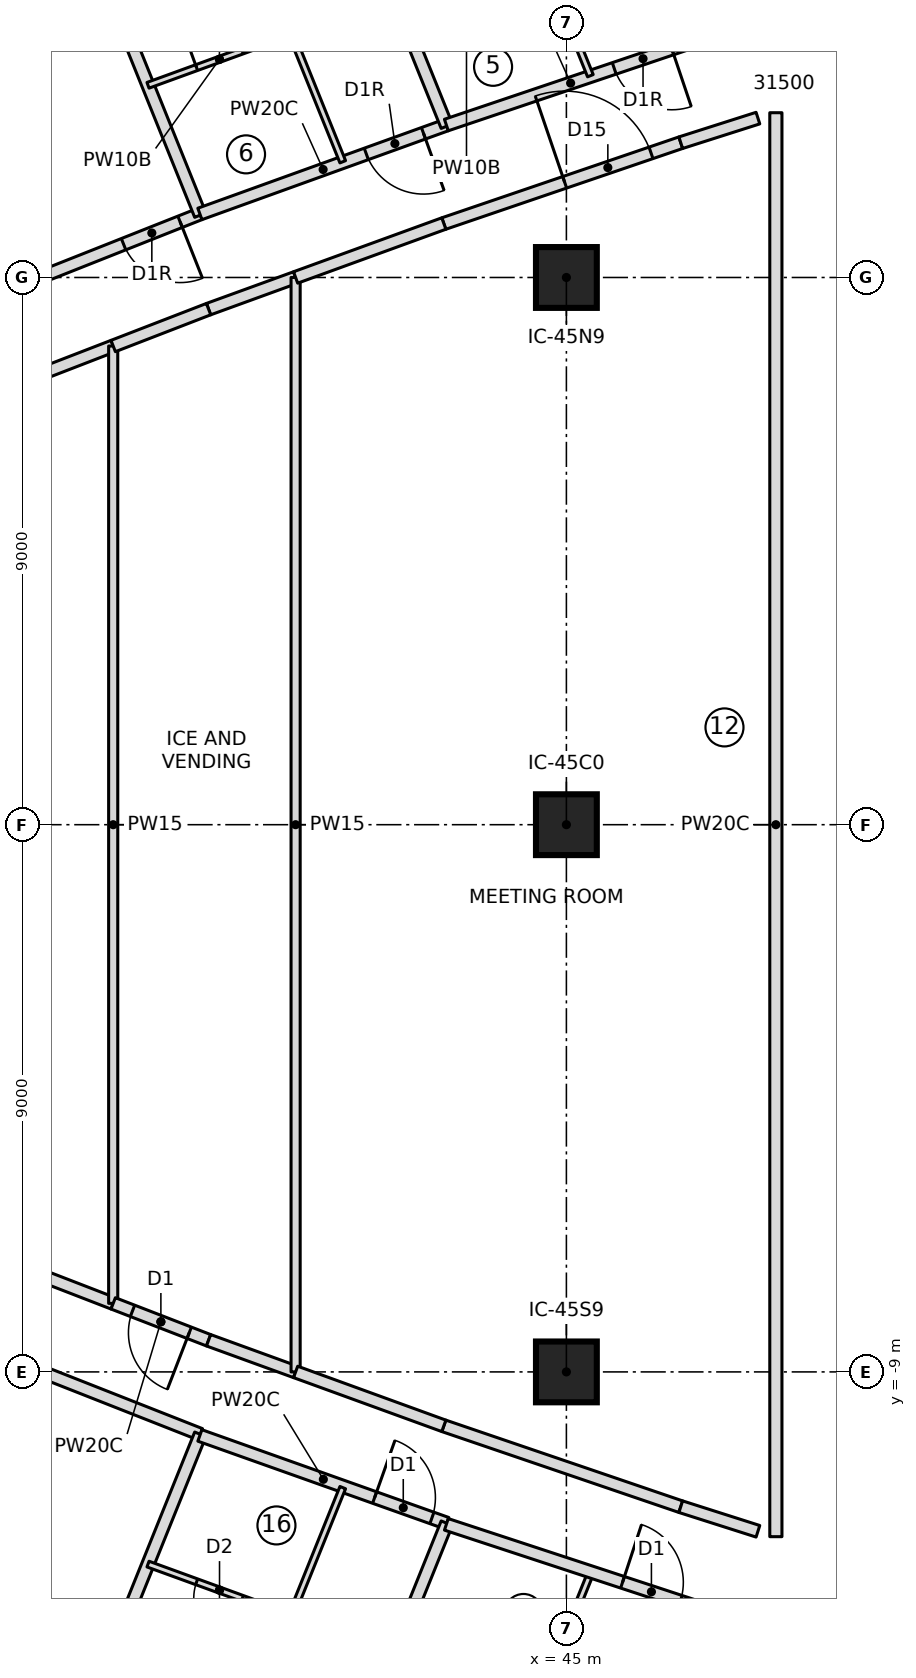
"""IFC4 building model, lengths in metres.
Left out: names, types, materials, properties, quantities, classifications, styles, units other than length and angle.
Written with IfcOpenShell. Run it as: python <this file> out.ifc"""

import sys

from ifc_helpers import new_model, si_unit, direction, frame, frame_2d, origin, origin_2d, place, context, subcontext, project, spatial, rectangle, extrude, element, fill, save


model = new_model("IFC4")
c1 = context("Model", 3, precision=1e-05, world=origin(), true_north=direction((0.0, 1.0)))
c2 = subcontext(c1, "Body", "Model", "MODEL_VIEW")
j1 = project(units=[si_unit("LENGTHUNIT", "METRE"), si_unit("PLANEANGLEUNIT", "RADIAN")], contexts=[c1])
p1 = place(None, origin())
s1 = spatial("IfcSite", under=j1, at=p1, CompositionType="ELEMENT")
p2 = place(p1, origin())
s2 = spatial("IfcBuilding", under=s1, at=p2, CompositionType="ELEMENT")
p3 = place(p2, frame((0.0, 0.0, 175.5)))
s3 = spatial("IfcBuildingStorey", under=s2, at=p3, CompositionType="ELEMENT", Elevation=175.5)
for number, where, z_axis, x_axis in (
    (1, (45.0, -9.0, 0.0), (0.0, 0.0, 1.0), (1.0, 0.0, 0.0)),
    (2, (45.0, 0.0, 0.0), (0.0, 0.0, 1.0), (1.0, 0.0, 0.0)),
    (3, (45.0, 9.0, 0.0), (0.0, 0.0, 1.0), (1.0, 0.0, 0.0)),
):
    element("IfcColumn", number, at=place(p3, frame(where, z_axis=z_axis, x_axis=x_axis)), inside=s3, PredefinedType="COLUMN", context=c2, shape_type="SweptSolid", body=[
        extrude(rectangle(XDim=1.0, YDim=1.0, at=origin_2d()), origin(), (0.0, 0.0, 1.0), 3.55),
    ])
p4 = place(p3, frame((38.972, 10.045, 0.0), z_axis=(0.0, 0.0, 1.0), x_axis=(-0.929554647243, -0.368684360651, 0.0)))
e4 = element("IfcWall", 4, at=p4, inside=s3, PredefinedType="PARTITIONING", context=c2, shape_type="SweptSolid", body=[
    extrude(rectangle(XDim=8.622, YDim=0.2, at=frame_2d((4.311, 0.0))), origin(), (0.0, 0.0, 1.0), 3.25),
])
p5 = place(p4, frame((0.35, 0.0, 0.0)))
e5 = element("IfcOpeningElement", 5, at=p5, cuts=e4, PredefinedType="OPENING", context=c2, shape_type="SweptSolid", body=[
    extrude(rectangle(XDim=1.0, YDim=2.1, at=frame_2d((0.5, 1.05))), frame((0.0, 0.11, 0.0), z_axis=(0.0, -1.0, 0.0), x_axis=(1.0, 0.0, 0.0)), (0.0, 0.0, 1.0), 0.22),
])
p6 = place(p3, frame((38.98, 10.026, 0.0), z_axis=(0.0, 0.0, 1.0), x_axis=(-0.373863662938, 0.927483671843, 0.0)))
e6 = element("IfcWall", 6, at=p6, inside=s3, PredefinedType="PARTITIONING", context=c2, shape_type="SweptSolid", body=[
    extrude(rectangle(XDim=7.604, YDim=0.2, at=frame_2d((3.802, 0.0))), origin(), (0.0, 0.0, 1.0), 3.25),
])
p7 = place(p3, frame((43.026, 11.507, 0.0), z_axis=(0.0, 0.0, 1.0), x_axis=(-0.940653905433, -0.339367397069, 0.0)))
e7 = element("IfcWall", 7, at=p7, inside=s3, PredefinedType="PARTITIONING", context=c2, shape_type="SweptSolid", body=[
    extrude(rectangle(XDim=4.309, YDim=0.2, at=frame_2d((2.155, 0.0))), origin(), (0.0, 0.0, 1.0), 3.25),
])
p8 = place(p7, frame((0.4, 0.0, 0.0)))
e8 = element("IfcOpeningElement", 8, at=p8, cuts=e7, PredefinedType="OPENING", context=c2, shape_type="SweptSolid", body=[
    extrude(rectangle(XDim=1.0, YDim=2.1, at=frame_2d((0.5, 1.05))), frame((0.0, 0.11, 0.0), z_axis=(0.0, -1.0, 0.0), x_axis=(1.0, 0.0, 0.0)), (0.0, 0.0, 1.0), 0.22),
])
p9 = place(p3, frame((38.119, 12.161, 0.0), z_axis=(0.0, 0.0, 1.0), x_axis=(0.939744972593, 0.341876273652, 0.0)))
e9 = element("IfcWall", 9, at=p9, inside=s3, PredefinedType="PARTITIONING", context=c2, shape_type="SweptSolid", body=[
    extrude(rectangle(XDim=2.501, YDim=0.1, at=frame_2d((1.251, 0.0))), origin(), (0.0, 0.0, 1.0), 3.25),
])
p10 = place(p9, frame((0.85, 0.0, 0.0)))
e10 = element("IfcOpeningElement", 10, at=p10, cuts=e9, PredefinedType="OPENING", context=c2, shape_type="SweptSolid", body=[
    extrude(rectangle(XDim=0.8, YDim=2.1, at=frame_2d((0.4, 1.05))), frame((0.0, 0.06, 0.0), z_axis=(0.0, -1.0, 0.0), x_axis=(1.0, 0.0, 0.0)), (0.0, 0.0, 1.0), 0.12),
])
p11 = place(p3, frame((40.47, 13.016, 0.0), z_axis=(0.0, 0.0, 1.0), x_axis=(0.373846436826, -0.927490615409, 0.0)))
e11 = element("IfcWall", 11, at=p11, inside=s3, PredefinedType="PARTITIONING", context=c2, shape_type="SweptSolid", body=[
    extrude(rectangle(XDim=2.279, YDim=0.1, at=frame_2d((1.139, 0.0))), origin(), (0.0, 0.0, 1.0), 3.25),
])
p12 = place(p3, frame((43.033, 11.489, 0.0), z_axis=(0.0, 0.0, 1.0), x_axis=(-0.373877998371, 0.927477893178, 0.0)))
e12 = element("IfcWall", 12, at=p12, inside=s3, PredefinedType="PARTITIONING", context=c2, shape_type="SweptSolid", body=[
    extrude(rectangle(XDim=7.611, YDim=0.2, at=frame_2d((3.806, 0.0))), origin(), (0.0, 0.0, 1.0), 3.25),
])
p13 = place(p3, frame((47.113, 12.886, 0.0), z_axis=(0.0, 0.0, 1.0), x_axis=(-0.947550995841, -0.319604615549, 0.0)))
e13 = element("IfcWall", 13, at=p13, inside=s3, PredefinedType="PARTITIONING", context=c2, shape_type="SweptSolid", body=[
    extrude(rectangle(XDim=4.314, YDim=0.2, at=frame_2d((2.157, 0.0))), origin(), (0.0, 0.0, 1.0), 3.25),
])
p14 = place(p13, frame((0.4, 0.0, 0.0)))
e14 = element("IfcOpeningElement", 14, at=p14, cuts=e13, PredefinedType="OPENING", context=c2, shape_type="SweptSolid", body=[
    extrude(rectangle(XDim=1.0, YDim=2.1, at=frame_2d((0.5, 1.05))), frame((0.0, 0.11, 0.0), z_axis=(0.0, -1.0, 0.0), x_axis=(1.0, 0.0, 0.0)), (0.0, 0.0, 1.0), 0.22),
])
p15 = place(p3, frame((44.542, 14.434, 0.0), z_axis=(0.0, 0.0, 1.0), x_axis=(0.373917841166, -0.927461831052, 0.0)))
e15 = element("IfcWall", 15, at=p15, inside=s3, PredefinedType="PARTITIONING", context=c2, shape_type="SweptSolid", body=[
    extrude(rectangle(XDim=2.281, YDim=0.1, at=frame_2d((1.14, 0.0))), origin(), (0.0, 0.0, 1.0), 3.25),
])
p16 = place(p3, frame((30.958, -6.866, 0.0), z_axis=(0.0, 0.0, 1.0), x_axis=(0.93040517394, -0.366532689274, 0.0)))
e16 = element("IfcWall", 16, at=p16, inside=s3, PredefinedType="PARTITIONING", context=c2, shape_type="SweptSolid", body=[
    extrude(rectangle(XDim=8.622, YDim=0.2, at=frame_2d((4.311, 0.0))), origin(), (0.0, 0.0, 1.0), 3.25),
])
p17 = place(p16, frame((4.25, 0.0, 0.0)))
e17 = element("IfcOpeningElement", 17, at=p17, cuts=e16, PredefinedType="OPENING", context=c2, shape_type="SweptSolid", body=[
    extrude(rectangle(XDim=1.0, YDim=2.1, at=frame_2d((0.5, 1.05))), frame((0.0, 0.11, 0.0), z_axis=(0.0, -1.0, 0.0), x_axis=(1.0, 0.0, 0.0)), (0.0, 0.0, 1.0), 0.22),
])
p18 = place(p3, frame((36.137, -17.079, 0.0), z_axis=(0.0, 0.0, 1.0), x_axis=(0.373863662938, 0.927483671843, 0.0)))
e18 = element("IfcWall", 18, at=p18, inside=s3, PredefinedType="PARTITIONING", context=c2, shape_type="SweptSolid", body=[
    extrude(rectangle(XDim=7.604, YDim=0.2, at=frame_2d((3.802, 0.0))), origin(), (0.0, 0.0, 1.0), 3.25),
])
p19 = place(p3, frame((38.972, -10.045, 0.0), z_axis=(0.0, 0.0, 1.0), x_axis=(0.942220252757, -0.334994022773, 0.0)))
e19 = element("IfcWall", 19, at=p19, inside=s3, PredefinedType="PARTITIONING", context=c2, shape_type="SweptSolid", body=[
    extrude(rectangle(XDim=4.31, YDim=0.2, at=frame_2d((2.155, 0.0))), origin(), (0.0, 0.0, 1.0), 3.25),
])
p20 = place(p19, frame((3.05, 0.0, 0.0)))
e20 = element("IfcOpeningElement", 20, at=p20, cuts=e19, PredefinedType="OPENING", context=c2, shape_type="SweptSolid", body=[
    extrude(rectangle(XDim=1.0, YDim=2.1, at=frame_2d((0.5, 1.05))), frame((0.0, 0.11, 0.0), z_axis=(0.0, -1.0, 0.0), x_axis=(1.0, 0.0, 0.0)), (0.0, 0.0, 1.0), 0.22),
])
p21 = place(p3, frame((41.322, -10.903, 0.0), z_axis=(0.0, 0.0, 1.0), x_axis=(-0.373846436826, -0.927490615409, 0.0)))
e21 = element("IfcWall", 21, at=p21, inside=s3, PredefinedType="PARTITIONING", context=c2, shape_type="SweptSolid", body=[
    extrude(rectangle(XDim=2.279, YDim=0.1, at=frame_2d((1.139, 0.0))), origin(), (0.0, 0.0, 1.0), 3.25),
])
p22 = place(p3, frame((40.47, -13.016, 0.0), z_axis=(0.0, 0.0, 1.0), x_axis=(-0.939744972593, 0.341876273652, 0.0)))
e22 = element("IfcWall", 22, at=p22, inside=s3, PredefinedType="PARTITIONING", context=c2, shape_type="SweptSolid", body=[
    extrude(rectangle(XDim=2.501, YDim=0.1, at=frame_2d((1.251, 0.0))), origin(), (0.0, 0.0, 1.0), 3.25),
])
p23 = place(p22, frame((0.85, 0.0, 0.0)))
e23 = element("IfcOpeningElement", 23, at=p23, cuts=e22, PredefinedType="OPENING", context=c2, shape_type="SweptSolid", body=[
    extrude(rectangle(XDim=0.8, YDim=2.1, at=frame_2d((0.4, 1.05))), frame((0.0, 0.06, 0.0), z_axis=(0.0, -1.0, 0.0), x_axis=(1.0, 0.0, 0.0)), (0.0, 0.0, 1.0), 0.12),
])
p24 = place(p3, frame((40.188, -18.548, 0.0), z_axis=(0.0, 0.0, 1.0), x_axis=(0.373877998371, 0.927477893178, 0.0)))
e24 = element("IfcWall", 24, at=p24, inside=s3, PredefinedType="PARTITIONING", context=c2, shape_type="SweptSolid", body=[
    extrude(rectangle(XDim=7.611, YDim=0.2, at=frame_2d((3.806, 0.0))), origin(), (0.0, 0.0, 1.0), 3.25),
])
p25 = place(p3, frame((45.395, -12.318, 0.0), z_axis=(0.0, 0.0, 1.0), x_axis=(-0.373917841166, -0.927461831052, 0.0)))
e25 = element("IfcWall", 25, at=p25, inside=s3, PredefinedType="PARTITIONING", context=c2, shape_type="SweptSolid", body=[
    extrude(rectangle(XDim=2.281, YDim=0.1, at=frame_2d((1.14, 0.0))), origin(), (0.0, 0.0, 1.0), 3.25),
])
for number, where, z_axis, x_axis in (
    (26, (35.276, 6.994, 0.0), (0.0, 0.0, 1.0), (0.933, 0.361, 0.0)),
    (27, (37.547, -7.873, 0.0), (0.0, 0.0, 1.0), (-0.933, 0.361, 0.0)),
):
    element("IfcWall", number, at=place(p3, frame(where, z_axis=z_axis, x_axis=x_axis)), inside=s3, PredefinedType="PARTITIONING", context=c2, shape_type="SweptSolid", body=[
        extrude(rectangle(XDim=2.435, YDim=0.2, at=frame_2d((1.218, 0.0))), origin(), (0.0, 0.0, 1.0), 3.25),
    ])
p26 = place(p3, frame((37.547, -7.873, 0.0), z_axis=(0.0, 0.0, 1.0), x_axis=(0.0, 1.0, 0.0)))
e28 = element("IfcWall", 28, at=p26, inside=s3, PredefinedType="PARTITIONING", context=c2, shape_type="SweptSolid", body=[
    extrude(rectangle(XDim=15.746, YDim=0.15, at=frame_2d((7.873, 0.0))), origin(), (0.0, 0.0, 1.0), 3.25),
])
p27 = place(p3, frame((39.115, -8.479, 0.0), z_axis=(0.0, 0.0, 1.0), x_axis=(-0.932670528514, 0.360729379511, 0.0)))
e29 = element("IfcWall", 29, at=p27, inside=s3, PredefinedType="PARTITIONING", context=c2, shape_type="SweptSolid", body=[
    extrude(rectangle(XDim=1.682, YDim=0.2, at=frame_2d((0.841, 0.0))), origin(), (0.0, 0.0, 1.0), 3.25),
])
p28 = place(p27, frame((0.341, 0.0, 0.0)))
e30 = element("IfcOpeningElement", 30, at=p28, cuts=e29, PredefinedType="OPENING", context=c2, shape_type="SweptSolid", body=[
    extrude(rectangle(XDim=1.0, YDim=2.1, at=frame_2d((0.5, 1.05))), frame((0.0, 0.11, 0.0), z_axis=(0.0, -1.0, 0.0), x_axis=(1.0, 0.0, 0.0)), (0.0, 0.0, 1.0), 0.22),
])
for number, where, z_axis, x_axis in (
    (31, (39.115, 8.479, 0.0), (0.0, 0.0, 1.0), (0.94, 0.342, 0.0)),
    (32, (40.547, -9.0, 0.0), (0.0, 0.0, 1.0), (-0.94, 0.342, 0.0)),
):
    element("IfcWall", number, at=place(p3, frame(where, z_axis=z_axis, x_axis=x_axis)), inside=s3, PredefinedType="PARTITIONING", context=c2, shape_type="SweptSolid", body=[
        extrude(rectangle(XDim=1.523, YDim=0.2, at=frame_2d((0.762, 0.0))), origin(), (0.0, 0.0, 1.0), 3.25),
    ])
p29 = place(p3, frame((37.547, 7.873, 0.0), z_axis=(0.0, 0.0, 1.0), x_axis=(0.932670528514, 0.360729379511, 0.0)))
e33 = element("IfcWall", 33, at=p29, inside=s3, PredefinedType="PARTITIONING", context=c2, shape_type="SweptSolid", body=[
    extrude(rectangle(XDim=1.682, YDim=0.2, at=frame_2d((0.841, 0.0))), origin(), (0.0, 0.0, 1.0), 3.25),
])
p30 = place(p3, frame((40.547, -9.0, 0.0), z_axis=(0.0, 0.0, 1.0), x_axis=(0.0, 1.0, 0.0)))
e34 = element("IfcWall", 34, at=p30, inside=s3, PredefinedType="PARTITIONING", context=c2, shape_type="SweptSolid", body=[
    extrude(rectangle(XDim=18.0, YDim=0.15, at=frame_2d((9.0, 0.0))), origin(), (0.0, 0.0, 1.0), 3.25),
])
p31 = place(p3, frame((42.984, 9.887, 0.0), z_axis=(0.0, 0.0, 1.0), x_axis=(0.946436071896, 0.322891253852, 0.0)))
e35 = element("IfcWall", 35, at=p31, inside=s3, PredefinedType="PARTITIONING", context=c2, shape_type="SweptSolid", body=[
    extrude(rectangle(XDim=4.117, YDim=0.2, at=frame_2d((2.059, 0.0))), origin(), (0.0, 0.0, 1.0), 3.25),
])
p32 = place(p31, frame((2.1, 0.0, 0.0)))
e36 = element("IfcOpeningElement", 36, at=p32, cuts=e35, PredefinedType="OPENING", context=c2, shape_type="SweptSolid", body=[
    extrude(rectangle(XDim=1.5, YDim=2.1, at=frame_2d((0.75, 1.05))), frame((0.0, 0.11, 0.0), z_axis=(0.0, -1.0, 0.0), x_axis=(1.0, 0.0, 0.0)), (0.0, 0.0, 1.0), 0.22),
])
p33 = place(p3, frame((46.881, -11.217, 0.0), z_axis=(0.0, 0.0, 1.0), x_axis=(-0.946436071896, 0.322891253852, 0.0)))
e37 = element("IfcWall", 37, at=p33, inside=s3, PredefinedType="PARTITIONING", context=c2, shape_type="SweptSolid", body=[
    extrude(rectangle(XDim=4.117, YDim=0.2, at=frame_2d((2.059, 0.0))), origin(), (0.0, 0.0, 1.0), 3.25),
])
for number, where, z_axis, x_axis in (
    (38, (42.984, -9.887, 0.0), (0.0, 0.0, 1.0), (-0.94, 0.342, 0.0)),
    (39, (40.547, 9.0, 0.0), (0.0, 0.0, 1.0), (0.94, 0.342, 0.0)),
):
    element("IfcWall", number, at=place(p3, frame(where, z_axis=z_axis, x_axis=x_axis)), inside=s3, PredefinedType="PARTITIONING", context=c2, shape_type="SweptSolid", body=[
        extrude(rectangle(XDim=2.594, YDim=0.2, at=frame_2d((1.297, 0.0))), origin(), (0.0, 0.0, 1.0), 3.25),
    ])
p34 = place(p3, frame((43.026, -11.507, 0.0), z_axis=(0.0, 0.0, 1.0), x_axis=(0.949951949432, -0.312396052744, 0.0)))
e40 = element("IfcWall", 40, at=p34, inside=s3, PredefinedType="PARTITIONING", context=c2, shape_type="SweptSolid", body=[
    extrude(rectangle(XDim=5.394, YDim=0.2, at=frame_2d((2.697, 0.0))), origin(), (0.0, 0.0, 1.0), 3.25),
])
p35 = place(p34, frame((3.05, 0.0, 0.0)))
e41 = element("IfcOpeningElement", 41, at=p35, cuts=e40, PredefinedType="OPENING", context=c2, shape_type="SweptSolid", body=[
    extrude(rectangle(XDim=1.0, YDim=2.1, at=frame_2d((0.5, 1.05))), frame((0.0, 0.11, 0.0), z_axis=(0.0, -1.0, 0.0), x_axis=(1.0, 0.0, 0.0)), (0.0, 0.0, 1.0), 0.22),
])
for number, where, z_axis, x_axis in (
    (42, (46.881, 11.217, 0.0), (0.0, 0.0, 1.0), (0.953, 0.304, 0.0)),
    (43, (48.15, -11.621, 0.0), (0.0, 0.0, 1.0), (-0.953, 0.304, 0.0)),
):
    element("IfcWall", number, at=place(p3, frame(where, z_axis=z_axis, x_axis=x_axis)), inside=s3, PredefinedType="PARTITIONING", context=c2, shape_type="SweptSolid", body=[
        extrude(rectangle(XDim=1.332, YDim=0.2, at=frame_2d((0.666, 0.0))), origin(), (0.0, 0.0, 1.0), 3.25),
    ])
p36 = place(p3, frame((48.445, 11.71, 0.0), z_axis=(0.0, 0.0, 1.0), x_axis=(0.0, -1.0, 0.0)))
e44 = element("IfcWall", 44, at=p36, inside=s3, PredefinedType="PARTITIONING", context=c2, shape_type="SweptSolid", body=[
    extrude(rectangle(XDim=23.42, YDim=0.2, at=frame_2d((11.71, 0.0))), origin(), (0.0, 0.0, 1.0), 3.25),
])
p37 = place(p5, origin())
e45 = element("IfcDoor", 45, at=p37, inside=s3, OperationType="SINGLE_SWING_RIGHT", PredefinedType="DOOR", context=c2, shape_type="SweptSolid", body=[
    extrude(rectangle(XDim=1.0, YDim=2.1, at=frame_2d((0.5, 1.05))), frame((0.0, 0.025, 0.0), z_axis=(0.0, -1.0, 0.0), x_axis=(1.0, 0.0, 0.0)), (0.0, 0.0, 1.0), 0.05),
])
fill(e5, e45)
p38 = place(p10, origin())
e46 = element("IfcDoor", 46, at=p38, inside=s3, OperationType="SINGLE_SWING_LEFT", PredefinedType="DOOR", context=c2, shape_type="SweptSolid", body=[
    extrude(rectangle(XDim=0.8, YDim=2.1, at=frame_2d((0.4, 1.05))), frame((0.0, 0.025, 0.0), z_axis=(0.0, -1.0, 0.0), x_axis=(1.0, 0.0, 0.0)), (0.0, 0.0, 1.0), 0.05),
])
fill(e10, e46)
p39 = place(p8, origin())
e47 = element("IfcDoor", 47, at=p39, inside=s3, OperationType="SINGLE_SWING_RIGHT", PredefinedType="DOOR", context=c2, shape_type="SweptSolid", body=[
    extrude(rectangle(XDim=1.0, YDim=2.1, at=frame_2d((0.5, 1.05))), frame((0.0, 0.025, 0.0), z_axis=(0.0, -1.0, 0.0), x_axis=(1.0, 0.0, 0.0)), (0.0, 0.0, 1.0), 0.05),
])
fill(e8, e47)
p40 = place(p14, origin())
e48 = element("IfcDoor", 48, at=p40, inside=s3, OperationType="SINGLE_SWING_RIGHT", PredefinedType="DOOR", context=c2, shape_type="SweptSolid", body=[
    extrude(rectangle(XDim=1.0, YDim=2.1, at=frame_2d((0.5, 1.05))), frame((0.0, 0.025, 0.0), z_axis=(0.0, -1.0, 0.0), x_axis=(1.0, 0.0, 0.0)), (0.0, 0.0, 1.0), 0.05),
])
fill(e14, e48)
p41 = place(p23, origin())
e49 = element("IfcDoor", 49, at=p41, inside=s3, OperationType="SINGLE_SWING_LEFT", PredefinedType="DOOR", context=c2, shape_type="SweptSolid", body=[
    extrude(rectangle(XDim=0.8, YDim=2.1, at=frame_2d((0.4, 1.05))), frame((0.0, 0.025, 0.0), z_axis=(0.0, -1.0, 0.0), x_axis=(1.0, 0.0, 0.0)), (0.0, 0.0, 1.0), 0.05),
])
fill(e23, e49)
p42 = place(p20, origin())
e50 = element("IfcDoor", 50, at=p42, inside=s3, OperationType="SINGLE_SWING_LEFT", PredefinedType="DOOR", context=c2, shape_type="SweptSolid", body=[
    extrude(rectangle(XDim=1.0, YDim=2.1, at=frame_2d((0.5, 1.05))), frame((0.0, 0.025, 0.0), z_axis=(0.0, -1.0, 0.0), x_axis=(1.0, 0.0, 0.0)), (0.0, 0.0, 1.0), 0.05),
])
fill(e20, e50)
p43 = place(p35, origin())
e51 = element("IfcDoor", 51, at=p43, inside=s3, OperationType="SINGLE_SWING_LEFT", PredefinedType="DOOR", context=c2, shape_type="SweptSolid", body=[
    extrude(rectangle(XDim=1.0, YDim=2.1, at=frame_2d((0.5, 1.05))), frame((0.0, 0.025, 0.0), z_axis=(0.0, -1.0, 0.0), x_axis=(1.0, 0.0, 0.0)), (0.0, 0.0, 1.0), 0.05),
])
fill(e41, e51)
p44 = place(p28, origin())
e52 = element("IfcDoor", 52, at=p44, inside=s3, OperationType="SINGLE_SWING_LEFT", PredefinedType="DOOR", context=c2, shape_type="SweptSolid", body=[
    extrude(rectangle(XDim=1.0, YDim=2.1, at=frame_2d((0.5, 1.05))), frame((0.0, 0.025, 0.0), z_axis=(0.0, -1.0, 0.0), x_axis=(1.0, 0.0, 0.0)), (0.0, 0.0, 1.0), 0.05),
])
fill(e30, e52)
p45 = place(p32, origin())
e53 = element("IfcDoor", 53, at=p45, inside=s3, OperationType="DOUBLE_DOOR_SINGLE_SWING", PredefinedType="DOOR", context=c2, shape_type="SweptSolid", body=[
    extrude(rectangle(XDim=1.5, YDim=2.1, at=frame_2d((0.75, 1.05))), frame((0.0, 0.025, 0.0), z_axis=(0.0, -1.0, 0.0), x_axis=(1.0, 0.0, 0.0)), (0.0, 0.0, 1.0), 0.05),
])
fill(e36, e53)
save(model, sys.argv[1])
